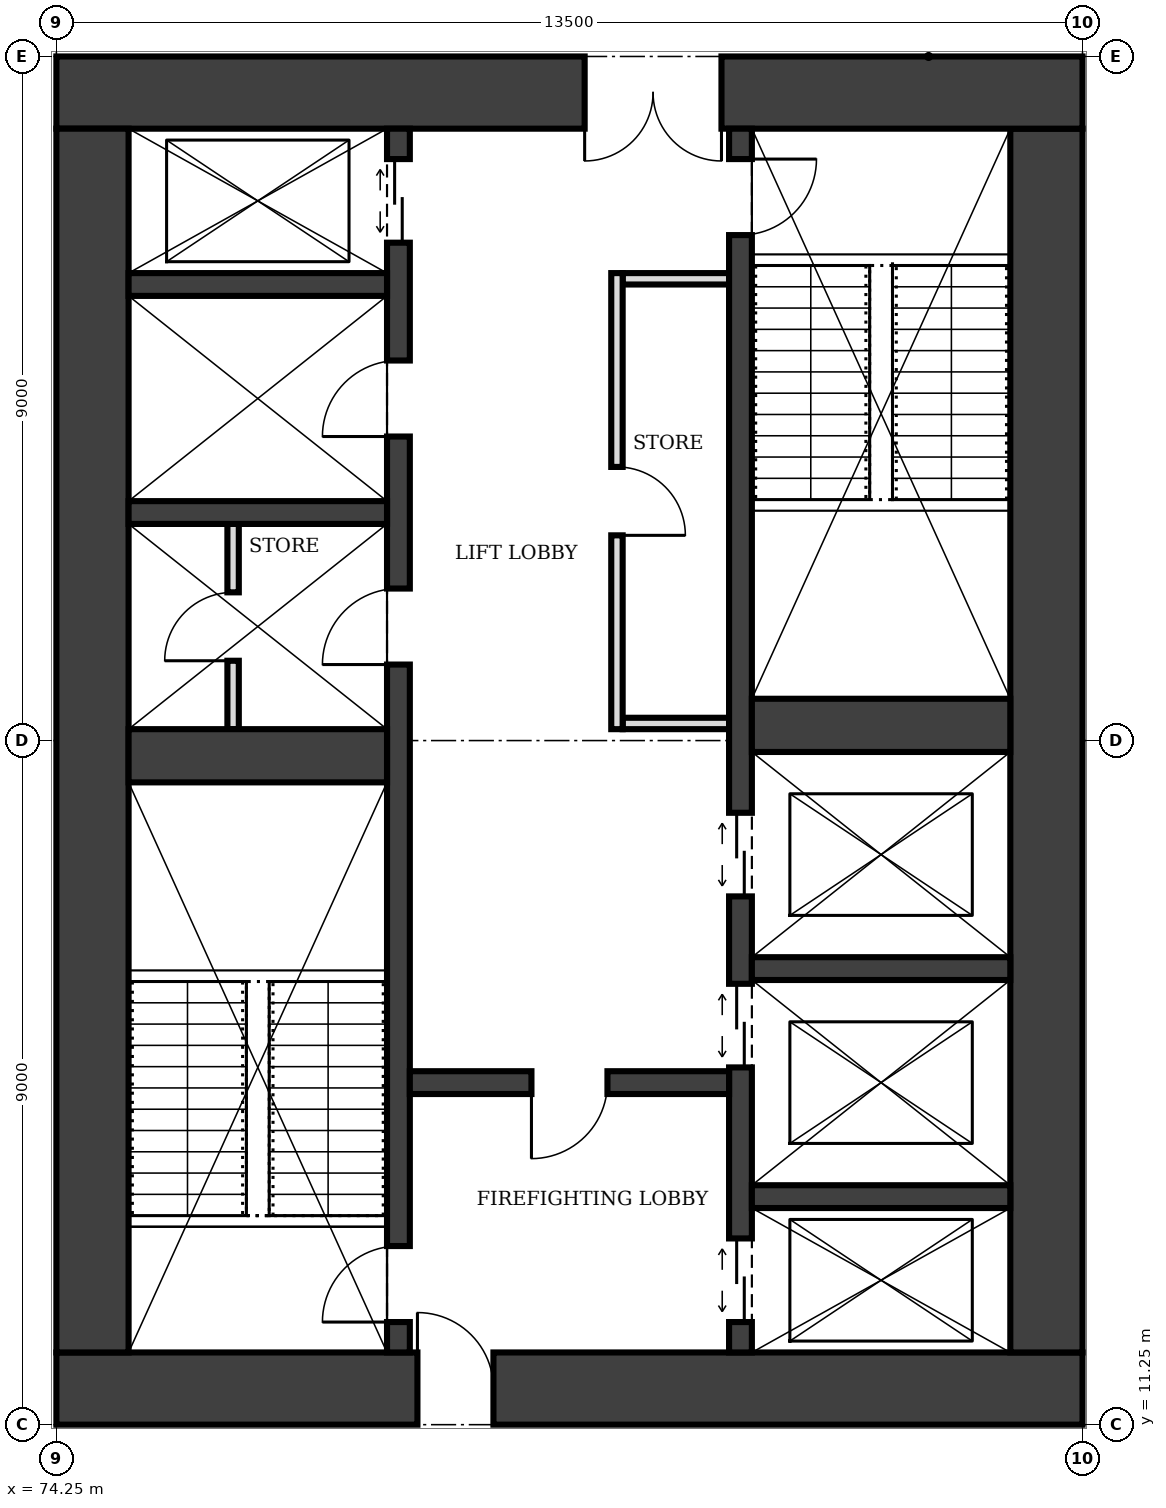
"""IFC4 building model, lengths in metres.
Left out: names, types, materials, properties, quantities, classifications, styles, units other than length and angle.
Written with IfcOpenShell. Run it as: python <this file> out.ifc"""

import sys

from ifc_helpers import new_model, si_unit, direction, frame, frame_2d, origin, place, context, subcontext, project, spatial, rectangle, extrude, element, fill, save


model = new_model("IFC4")
c1 = context("Model", 3, precision=1e-05, world=origin(), true_north=direction((0.0, 1.0)))
c2 = subcontext(c1, "Body", "Model", "MODEL_VIEW")
j1 = project(units=[si_unit("LENGTHUNIT", "METRE"), si_unit("PLANEANGLEUNIT", "RADIAN")], contexts=[c1])
p1 = place(None, origin())
s1 = spatial("IfcSite", under=j1, at=p1, CompositionType="ELEMENT")
p2 = place(p1, origin())
s2 = spatial("IfcBuilding", under=s1, at=p2, CompositionType="ELEMENT")
p3 = place(p2, frame((0.0, 0.0, 229.0)))
s3 = spatial("IfcBuildingStorey", under=s2, at=p3, CompositionType="ELEMENT", Elevation=229.0)
p4 = place(p3, frame((74.25, 11.725, 0.0), z_axis=(0.0, 0.0, 1.0), x_axis=(1.0, 0.0, 0.0)))
e1 = element("IfcWall", 1, at=p4, inside=s3, PredefinedType="SHEAR", context=c2, shape_type="SweptSolid", body=[
    extrude(rectangle(XDim=13.5, YDim=0.95, at=frame_2d((6.75, 0.0))), origin(), (0.0, 0.0, 1.0), 4.0),
])
p5 = place(p4, frame((4.75, 0.0, 0.0)))
e2 = element("IfcOpeningElement", 2, at=p5, cuts=e1, PredefinedType="OPENING", context=c2, shape_type="SweptSolid", body=[
    extrude(rectangle(XDim=1.0, YDim=2.1, at=frame_2d((0.5, 1.05))), frame((0.0, 0.485, 0.0), z_axis=(0.0, -1.0, 0.0), x_axis=(1.0, 0.0, 0.0)), (0.0, 0.0, 1.0), 0.97),
])
p6 = place(p3, frame((87.275, 12.2, 0.0), z_axis=(0.0, 0.0, 1.0), x_axis=(0.0, 1.0, 0.0)))
e3 = element("IfcWall", 3, at=p6, inside=s3, PredefinedType="SHEAR", context=c2, shape_type="SweptSolid", body=[
    extrude(rectangle(XDim=16.1, YDim=0.95, at=frame_2d((8.05, 0.0))), origin(), (0.0, 0.0, 1.0), 4.0),
])
p7 = place(p3, frame((87.75, 28.775, 0.0), z_axis=(0.0, 0.0, 1.0), x_axis=(-1.0, 0.0, 0.0)))
e4 = element("IfcWall", 4, at=p7, inside=s3, PredefinedType="SHEAR", context=c2, shape_type="SweptSolid", body=[
    extrude(rectangle(XDim=13.5, YDim=0.95, at=frame_2d((6.75, 0.0))), origin(), (0.0, 0.0, 1.0), 4.0),
])
p8 = place(p7, frame((4.75, 0.0, 0.0)))
e5 = element("IfcOpeningElement", 5, at=p8, cuts=e4, PredefinedType="OPENING", context=c2, shape_type="SweptSolid", body=[
    extrude(rectangle(XDim=1.8, YDim=2.1, at=frame_2d((0.9, 1.05))), frame((0.0, 0.485, 0.0), z_axis=(0.0, -1.0, 0.0), x_axis=(1.0, 0.0, 0.0)), (0.0, 0.0, 1.0), 0.97),
])
p9 = place(p3, frame((74.725, 28.3, 0.0), z_axis=(0.0, 0.0, 1.0), x_axis=(0.0, -1.0, 0.0)))
e6 = element("IfcWall", 6, at=p9, inside=s3, PredefinedType="SHEAR", context=c2, shape_type="SweptSolid", body=[
    extrude(rectangle(XDim=16.1, YDim=0.95, at=frame_2d((8.05, 0.0))), origin(), (0.0, 0.0, 1.0), 4.0),
])
p10 = place(p3, frame((78.75, 12.2, 0.0), z_axis=(0.0, 0.0, 1.0), x_axis=(0.0, 1.0, 0.0)))
e7 = element("IfcWall", 7, at=p10, inside=s3, PredefinedType="SHEAR", context=c2, shape_type="SweptSolid", body=[
    extrude(rectangle(XDim=16.1, YDim=0.3, at=frame_2d((8.05, 0.0))), origin(), (0.0, 0.0, 1.0), 4.0),
])
p11 = place(p10, frame((0.4, 0.0, 0.0)))
e8 = element("IfcOpeningElement", 8, at=p11, cuts=e7, PredefinedType="OPENING", context=c2, shape_type="SweptSolid", body=[
    extrude(rectangle(XDim=1.0, YDim=2.1, at=frame_2d((0.5, 1.05))), frame((0.0, 0.16, 0.0), z_axis=(0.0, -1.0, 0.0), x_axis=(1.0, 0.0, 0.0)), (0.0, 0.0, 1.0), 0.32),
])
p12 = place(p10, frame((14.6, 0.0, 0.0)))
e9 = element("IfcOpeningElement", 9, at=p12, cuts=e7, PredefinedType="OPENING", context=c2, shape_type="SweptSolid", body=[
    extrude(rectangle(XDim=1.1, YDim=2.1, at=frame_2d((0.55, 1.05))), frame((0.0, 0.16, 0.0), z_axis=(0.0, -1.0, 0.0), x_axis=(1.0, 0.0, 0.0)), (0.0, 0.0, 1.0), 0.32),
])
p13 = place(p10, frame((9.05, 0.0, 0.0)))
e10 = element("IfcOpeningElement", 10, at=p13, cuts=e7, PredefinedType="OPENING", context=c2, shape_type="SweptSolid", body=[
    extrude(rectangle(XDim=1.0, YDim=2.1, at=frame_2d((0.5, 1.05))), frame((0.0, 0.16, 0.0), z_axis=(0.0, -1.0, 0.0), x_axis=(1.0, 0.0, 0.0)), (0.0, 0.0, 1.0), 0.32),
])
p14 = place(p10, frame((12.05, 0.0, 0.0)))
e11 = element("IfcOpeningElement", 11, at=p14, cuts=e7, PredefinedType="OPENING", context=c2, shape_type="SweptSolid", body=[
    extrude(rectangle(XDim=1.0, YDim=2.1, at=frame_2d((0.5, 1.05))), frame((0.0, 0.16, 0.0), z_axis=(0.0, -1.0, 0.0), x_axis=(1.0, 0.0, 0.0)), (0.0, 0.0, 1.0), 0.32),
])
p15 = place(p3, frame((83.25, 12.2, 0.0), z_axis=(0.0, 0.0, 1.0), x_axis=(0.0, 1.0, 0.0)))
e12 = element("IfcWall", 12, at=p15, inside=s3, PredefinedType="SHEAR", context=c2, shape_type="SweptSolid", body=[
    extrude(rectangle(XDim=16.1, YDim=0.3, at=frame_2d((8.05, 0.0))), origin(), (0.0, 0.0, 1.0), 4.0),
])
p16 = place(p15, frame((14.7, 0.0, 0.0)))
e13 = element("IfcOpeningElement", 13, at=p16, cuts=e12, PredefinedType="OPENING", context=c2, shape_type="SweptSolid", body=[
    extrude(rectangle(XDim=1.0, YDim=2.1, at=frame_2d((0.5, 1.05))), frame((0.0, 0.16, 0.0), z_axis=(0.0, -1.0, 0.0), x_axis=(1.0, 0.0, 0.0)), (0.0, 0.0, 1.0), 0.32),
])
p17 = place(p15, frame((0.4, 0.0, 0.0)))
e14 = element("IfcOpeningElement", 14, at=p17, cuts=e12, PredefinedType="OPENING", context=c2, shape_type="SweptSolid", body=[
    extrude(rectangle(XDim=1.1, YDim=2.1, at=frame_2d((0.55, 1.05))), frame((0.0, 0.16, 0.0), z_axis=(0.0, -1.0, 0.0), x_axis=(1.0, 0.0, 0.0)), (0.0, 0.0, 1.0), 0.32),
])
p18 = place(p15, frame((3.75, 0.0, 0.0)))
e15 = element("IfcOpeningElement", 15, at=p18, cuts=e12, PredefinedType="OPENING", context=c2, shape_type="SweptSolid", body=[
    extrude(rectangle(XDim=1.1, YDim=2.1, at=frame_2d((0.55, 1.05))), frame((0.0, 0.16, 0.0), z_axis=(0.0, -1.0, 0.0), x_axis=(1.0, 0.0, 0.0)), (0.0, 0.0, 1.0), 0.32),
])
p19 = place(p15, frame((6.0, 0.0, 0.0)))
e16 = element("IfcOpeningElement", 16, at=p19, cuts=e12, PredefinedType="OPENING", context=c2, shape_type="SweptSolid", body=[
    extrude(rectangle(XDim=1.1, YDim=2.1, at=frame_2d((0.55, 1.05))), frame((0.0, 0.16, 0.0), z_axis=(0.0, -1.0, 0.0), x_axis=(1.0, 0.0, 0.0)), (0.0, 0.0, 1.0), 0.32),
])
p20 = place(p3, frame((75.2, 20.05, 0.0), z_axis=(0.0, 0.0, 1.0), x_axis=(1.0, 0.0, 0.0)))
e17 = element("IfcWall", 17, at=p20, inside=s3, PredefinedType="SHEAR", context=c2, shape_type="SweptSolid", body=[
    extrude(rectangle(XDim=3.4, YDim=0.7, at=frame_2d((1.7, 0.0))), origin(), (0.0, 0.0, 1.0), 4.0),
])
p21 = place(p3, frame((78.9, 15.75, 0.0), z_axis=(0.0, 0.0, 1.0), x_axis=(1.0, 0.0, 0.0)))
e18 = element("IfcWall", 18, at=p21, inside=s3, PredefinedType="SHEAR", context=c2, shape_type="SweptSolid", body=[
    extrude(rectangle(XDim=4.2, YDim=0.3, at=frame_2d((2.1, 0.0))), origin(), (0.0, 0.0, 1.0), 4.0),
])
p22 = place(p21, frame((1.6, 0.0, 0.0)))
e19 = element("IfcOpeningElement", 19, at=p22, cuts=e18, PredefinedType="OPENING", context=c2, shape_type="SweptSolid", body=[
    extrude(rectangle(XDim=1.0, YDim=2.1, at=frame_2d((0.5, 1.05))), frame((0.0, 0.16, 0.0), z_axis=(0.0, -1.0, 0.0), x_axis=(1.0, 0.0, 0.0)), (0.0, 0.0, 1.0), 0.32),
])
for number, where, z_axis, x_axis in (
    (20, (83.4, 14.25, 0.0), (0.0, 0.0, 1.0), (1.0, 0.0, 0.0)),
    (21, (83.4, 17.25, 0.0), (0.0, 0.0, 1.0), (1.0, 0.0, 0.0)),
):
    element("IfcWall", number, at=place(p3, frame(where, z_axis=z_axis, x_axis=x_axis)), inside=s3, PredefinedType="SHEAR", context=c2, shape_type="SweptSolid", body=[
        extrude(rectangle(XDim=3.4, YDim=0.3, at=frame_2d((1.7, 0.0))), origin(), (0.0, 0.0, 1.0), 4.0),
    ])
p23 = place(p3, frame((83.4, 20.45, 0.0), z_axis=(0.0, 0.0, 1.0), x_axis=(1.0, 0.0, 0.0)))
e22 = element("IfcWall", 22, at=p23, inside=s3, PredefinedType="SHEAR", context=c2, shape_type="SweptSolid", body=[
    extrude(rectangle(XDim=3.4, YDim=0.7, at=frame_2d((1.7, 0.0))), origin(), (0.0, 0.0, 1.0), 4.0),
])
for number, where, z_axis, x_axis in (
    (23, (75.2, 23.25, 0.0), (0.0, 0.0, 1.0), (1.0, 0.0, 0.0)),
    (24, (75.2, 26.25, 0.0), (0.0, 0.0, 1.0), (1.0, 0.0, 0.0)),
):
    element("IfcWall", number, at=place(p3, frame(where, z_axis=z_axis, x_axis=x_axis)), inside=s3, PredefinedType="SHEAR", context=c2, shape_type="SweptSolid", body=[
        extrude(rectangle(XDim=3.4, YDim=0.3, at=frame_2d((1.7, 0.0))), origin(), (0.0, 0.0, 1.0), 4.0),
    ])
p24 = place(p3, frame((81.625, 20.4, 0.0), z_axis=(0.0, 0.0, 1.0), x_axis=(0.0, 1.0, 0.0)))
e25 = element("IfcWall", 25, at=p24, inside=s3, PredefinedType="PARTITIONING", context=c2, shape_type="SweptSolid", body=[
    extrude(rectangle(XDim=6.0, YDim=0.15, at=frame_2d((3.0, 0.0))), origin(), (0.0, 0.0, 1.0), 3.75),
])
p25 = place(p24, frame((2.55, 0.0, 0.0)))
e26 = element("IfcOpeningElement", 26, at=p25, cuts=e25, PredefinedType="OPENING", context=c2, shape_type="SweptSolid", body=[
    extrude(rectangle(XDim=0.9, YDim=2.1, at=frame_2d((0.45, 1.05))), frame((0.0, 0.085, 0.0), z_axis=(0.0, -1.0, 0.0), x_axis=(1.0, 0.0, 0.0)), (0.0, 0.0, 1.0), 0.17),
])
for number, where, z_axis, x_axis in (
    (27, (81.7, 20.475, 0.0), (0.0, 0.0, 1.0), (1.0, 0.0, 0.0)),
    (28, (81.7, 26.325, 0.0), (0.0, 0.0, 1.0), (1.0, 0.0, 0.0)),
):
    element("IfcWall", number, at=place(p3, frame(where, z_axis=z_axis, x_axis=x_axis)), inside=s3, PredefinedType="PARTITIONING", context=c2, shape_type="SweptSolid", body=[
        extrude(rectangle(XDim=1.4, YDim=0.15, at=frame_2d((0.7, 0.0))), origin(), (0.0, 0.0, 1.0), 3.75),
    ])
p26 = place(p3, frame((76.575, 20.4, 0.0), z_axis=(0.0, 0.0, 1.0), x_axis=(0.0, 1.0, 0.0)))
e29 = element("IfcWall", 29, at=p26, inside=s3, PredefinedType="PARTITIONING", context=c2, shape_type="SweptSolid", body=[
    extrude(rectangle(XDim=2.7, YDim=0.15, at=frame_2d((1.35, 0.0))), origin(), (0.0, 0.0, 1.0), 3.75),
])
p27 = place(p26, frame((0.9, 0.0, 0.0)))
e30 = element("IfcOpeningElement", 30, at=p27, cuts=e29, PredefinedType="OPENING", context=c2, shape_type="SweptSolid", body=[
    extrude(rectangle(XDim=0.9, YDim=2.1, at=frame_2d((0.45, 1.05))), frame((0.0, 0.085, 0.0), z_axis=(0.0, -1.0, 0.0), x_axis=(1.0, 0.0, 0.0)), (0.0, 0.0, 1.0), 0.17),
])
p28 = place(p5, origin())
e31 = element("IfcDoor", 31, at=p28, inside=s3, OperationType="SINGLE_SWING_LEFT", PredefinedType="DOOR", context=c2, shape_type="SweptSolid", body=[
    extrude(rectangle(XDim=1.0, YDim=2.1, at=frame_2d((0.5, 1.05))), frame((0.0, 0.025, 0.0), z_axis=(0.0, -1.0, 0.0), x_axis=(1.0, 0.0, 0.0)), (0.0, 0.0, 1.0), 0.05),
])
fill(e2, e31)
p29 = place(p8, origin())
e32 = element("IfcDoor", 32, at=p29, inside=s3, OperationType="DOUBLE_DOOR_SINGLE_SWING", PredefinedType="DOOR", context=c2, shape_type="SweptSolid", body=[
    extrude(rectangle(XDim=1.8, YDim=2.1, at=frame_2d((0.9, 1.05))), frame((0.0, 0.025, 0.0), z_axis=(0.0, -1.0, 0.0), x_axis=(1.0, 0.0, 0.0)), (0.0, 0.0, 1.0), 0.05),
])
fill(e5, e32)
p30 = place(p22, frame((1.0, 0.0, 0.0), z_axis=(0.0, 0.0, 1.0), x_axis=(-1.0, 0.0, 0.0)))
e33 = element("IfcDoor", 33, at=p30, inside=s3, OperationType="SINGLE_SWING_RIGHT", PredefinedType="DOOR", context=c2, shape_type="SweptSolid", body=[
    extrude(rectangle(XDim=1.0, YDim=2.1, at=frame_2d((0.5, 1.05))), frame((0.0, 0.025, 0.0), z_axis=(0.0, -1.0, 0.0), x_axis=(1.0, 0.0, 0.0)), (0.0, 0.0, 1.0), 0.05),
])
fill(e19, e33)
p31 = place(p11, origin())
e34 = element("IfcDoor", 34, at=p31, inside=s3, OperationType="SINGLE_SWING_LEFT", PredefinedType="DOOR", context=c2, shape_type="SweptSolid", body=[
    extrude(rectangle(XDim=1.0, YDim=2.1, at=frame_2d((0.5, 1.05))), frame((0.0, 0.025, 0.0), z_axis=(0.0, -1.0, 0.0), x_axis=(1.0, 0.0, 0.0)), (0.0, 0.0, 1.0), 0.05),
])
fill(e8, e34)
p32 = place(p16, frame((1.0, 0.0, 0.0), z_axis=(0.0, 0.0, 1.0), x_axis=(-1.0, 0.0, 0.0)))
e35 = element("IfcDoor", 35, at=p32, inside=s3, OperationType="SINGLE_SWING_LEFT", PredefinedType="DOOR", context=c2, shape_type="SweptSolid", body=[
    extrude(rectangle(XDim=1.0, YDim=2.1, at=frame_2d((0.5, 1.05))), frame((0.0, 0.025, 0.0), z_axis=(0.0, -1.0, 0.0), x_axis=(1.0, 0.0, 0.0)), (0.0, 0.0, 1.0), 0.05),
])
fill(e13, e35)
p33 = place(p17, origin())
e36 = element("IfcDoor", 36, at=p33, inside=s3, OperationType="DOUBLE_DOOR_SLIDING", PredefinedType="DOOR", context=c2, shape_type="SweptSolid", body=[
    extrude(rectangle(XDim=1.1, YDim=2.1, at=frame_2d((0.55, 1.05))), frame((0.0, 0.025, 0.0), z_axis=(0.0, -1.0, 0.0), x_axis=(1.0, 0.0, 0.0)), (0.0, 0.0, 1.0), 0.05),
])
fill(e14, e36)
p34 = place(p12, origin())
e37 = element("IfcDoor", 37, at=p34, inside=s3, OperationType="DOUBLE_DOOR_SLIDING", PredefinedType="DOOR", context=c2, shape_type="SweptSolid", body=[
    extrude(rectangle(XDim=1.1, YDim=2.1, at=frame_2d((0.55, 1.05))), frame((0.0, 0.025, 0.0), z_axis=(0.0, -1.0, 0.0), x_axis=(1.0, 0.0, 0.0)), (0.0, 0.0, 1.0), 0.05),
])
fill(e9, e37)
p35 = place(p18, origin())
e38 = element("IfcDoor", 38, at=p35, inside=s3, OperationType="DOUBLE_DOOR_SLIDING", PredefinedType="DOOR", context=c2, shape_type="SweptSolid", body=[
    extrude(rectangle(XDim=1.1, YDim=2.1, at=frame_2d((0.55, 1.05))), frame((0.0, 0.025, 0.0), z_axis=(0.0, -1.0, 0.0), x_axis=(1.0, 0.0, 0.0)), (0.0, 0.0, 1.0), 0.05),
])
fill(e15, e38)
p36 = place(p19, origin())
e39 = element("IfcDoor", 39, at=p36, inside=s3, OperationType="DOUBLE_DOOR_SLIDING", PredefinedType="DOOR", context=c2, shape_type="SweptSolid", body=[
    extrude(rectangle(XDim=1.1, YDim=2.1, at=frame_2d((0.55, 1.05))), frame((0.0, 0.025, 0.0), z_axis=(0.0, -1.0, 0.0), x_axis=(1.0, 0.0, 0.0)), (0.0, 0.0, 1.0), 0.05),
])
fill(e16, e39)
p37 = place(p25, frame((0.9, 0.0, 0.0), z_axis=(0.0, 0.0, 1.0), x_axis=(-1.0, 0.0, 0.0)))
e40 = element("IfcDoor", 40, at=p37, inside=s3, OperationType="SINGLE_SWING_RIGHT", PredefinedType="DOOR", context=c2, shape_type="SweptSolid", body=[
    extrude(rectangle(XDim=0.9, YDim=2.1, at=frame_2d((0.45, 1.05))), frame((0.0, 0.025, 0.0), z_axis=(0.0, -1.0, 0.0), x_axis=(1.0, 0.0, 0.0)), (0.0, 0.0, 1.0), 0.05),
])
fill(e26, e40)
p38 = place(p13, origin())
e41 = element("IfcDoor", 41, at=p38, inside=s3, OperationType="SINGLE_SWING_LEFT", PredefinedType="DOOR", context=c2, shape_type="SweptSolid", body=[
    extrude(rectangle(XDim=1.0, YDim=2.1, at=frame_2d((0.5, 1.05))), frame((0.0, 0.025, 0.0), z_axis=(0.0, -1.0, 0.0), x_axis=(1.0, 0.0, 0.0)), (0.0, 0.0, 1.0), 0.05),
])
fill(e10, e41)
p39 = place(p27, origin())
e42 = element("IfcDoor", 42, at=p39, inside=s3, OperationType="SINGLE_SWING_LEFT", PredefinedType="DOOR", context=c2, shape_type="SweptSolid", body=[
    extrude(rectangle(XDim=0.9, YDim=2.1, at=frame_2d((0.45, 1.05))), frame((0.0, 0.025, 0.0), z_axis=(0.0, -1.0, 0.0), x_axis=(1.0, 0.0, 0.0)), (0.0, 0.0, 1.0), 0.05),
])
fill(e30, e42)
p40 = place(p14, origin())
e43 = element("IfcDoor", 43, at=p40, inside=s3, OperationType="SINGLE_SWING_LEFT", PredefinedType="DOOR", context=c2, shape_type="SweptSolid", body=[
    extrude(rectangle(XDim=1.0, YDim=2.1, at=frame_2d((0.5, 1.05))), frame((0.0, 0.025, 0.0), z_axis=(0.0, -1.0, 0.0), x_axis=(1.0, 0.0, 0.0)), (0.0, 0.0, 1.0), 0.05),
])
fill(e11, e43)
save(model, sys.argv[1])
